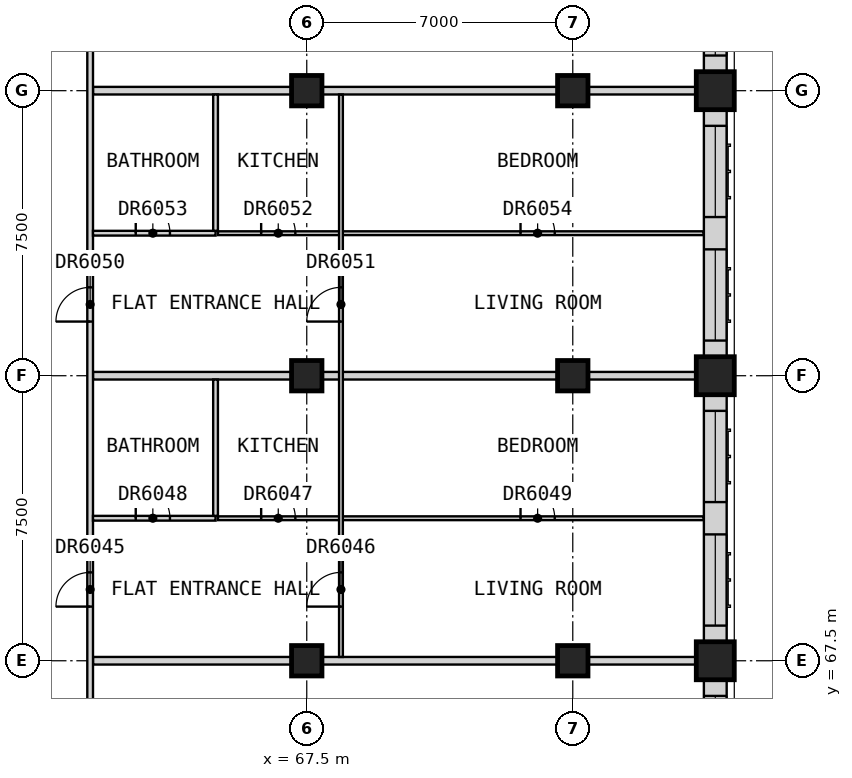
"""IFC4 building model, lengths in metres.
Left out: names, types, materials, properties, quantities, classifications, styles, units other than length and angle.
Written with IfcOpenShell. Run it as: python <this file> out.ifc"""

import sys

from ifc_helpers import new_model, si_unit, direction, frame, frame_2d, origin, origin_2d, place, context, subcontext, project, spatial, rectangle, extrude, element, fill, save


model = new_model("IFC4")
c1 = context("Model", 3, precision=1e-05, world=origin(), true_north=direction((0.0, 1.0)))
c2 = subcontext(c1, "Body", "Model", "MODEL_VIEW")
j1 = project(units=[si_unit("LENGTHUNIT", "METRE"), si_unit("PLANEANGLEUNIT", "RADIAN")], contexts=[c1])
p1 = place(None, origin())
s1 = spatial("IfcSite", under=j1, at=p1, CompositionType="ELEMENT")
p2 = place(p1, origin())
s2 = spatial("IfcBuilding", under=s1, at=p2, CompositionType="ELEMENT")
p3 = place(p2, frame((0.0, 0.0, 254.7)))
s3 = spatial("IfcBuildingStorey", under=s2, at=p3, CompositionType="ELEMENT", Elevation=254.7)
for number, where, z_axis, x_axis in (
    (1, (78.25, 67.5, 0.0), (0.0, 0.0, 1.0), (1.0, 0.0, 0.0)),
    (2, (78.25, 75.0, 0.0), (0.0, 0.0, 1.0), (1.0, 0.0, 0.0)),
    (3, (78.25, 82.5, 0.0), (0.0, 0.0, 1.0), (1.0, 0.0, 0.0)),
):
    element("IfcColumn", number, at=place(p3, frame(where, z_axis=z_axis, x_axis=x_axis)), inside=s3, PredefinedType="COLUMN", context=c2, shape_type="SweptSolid", body=[
        extrude(rectangle(XDim=1.0, YDim=1.0, at=origin_2d()), origin(), (0.0, 0.0, 1.0), 3.5),
    ])
for number, where, z_axis, x_axis in (
    (4, (67.5, 67.5, 0.0), (0.0, 0.0, 1.0), (1.0, 0.0, 0.0)),
    (5, (67.5, 75.0, 0.0), (0.0, 0.0, 1.0), (1.0, 0.0, 0.0)),
    (6, (67.5, 82.5, 0.0), (0.0, 0.0, 1.0), (1.0, 0.0, 0.0)),
    (7, (74.5, 67.5, 0.0), (0.0, 0.0, 1.0), (1.0, 0.0, 0.0)),
    (8, (74.5, 75.0, 0.0), (0.0, 0.0, 1.0), (1.0, 0.0, 0.0)),
    (9, (74.5, 82.5, 0.0), (0.0, 0.0, 1.0), (1.0, 0.0, 0.0)),
):
    element("IfcColumn", number, at=place(p3, frame(where, z_axis=z_axis, x_axis=x_axis)), inside=s3, PredefinedType="COLUMN", context=c2, shape_type="SweptSolid", body=[
        extrude(rectangle(XDim=0.8, YDim=0.8, at=origin_2d()), origin(), (0.0, 0.0, 1.0), 3.5),
    ])
p4 = place(p3, frame((78.25, 60.5, 0.0), z_axis=(0.0, 0.0, 1.0), x_axis=(0.0, 1.0, 0.0)))
e10 = element("IfcWall", 10, at=p4, inside=s3, PredefinedType="SOLIDWALL", context=c2, shape_type="SweptSolid", body=[
    extrude(rectangle(XDim=6.5, YDim=0.6, at=frame_2d((3.25, 0.0))), origin(), (0.0, 0.0, 1.0), 2.75),
])
p5 = place(p4, frame((0.425, 0.0, 0.8)))
e11 = element("IfcOpeningElement", 11, at=p5, cuts=e10, PredefinedType="OPENING", context=c2, shape_type="SweptSolid", body=[
    extrude(rectangle(XDim=2.4, YDim=1.8, at=frame_2d((1.2, 0.9))), frame((0.0, 0.31, 0.0), z_axis=(0.0, -1.0, 0.0), x_axis=(1.0, 0.0, 0.0)), (0.0, 0.0, 1.0), 0.62),
])
p6 = place(p4, frame((3.675, 0.0, 0.8)))
e12 = element("IfcOpeningElement", 12, at=p6, cuts=e10, PredefinedType="OPENING", context=c2, shape_type="SweptSolid", body=[
    extrude(rectangle(XDim=2.4, YDim=1.8, at=frame_2d((1.2, 0.9))), frame((0.0, 0.31, 0.0), z_axis=(0.0, -1.0, 0.0), x_axis=(1.0, 0.0, 0.0)), (0.0, 0.0, 1.0), 0.62),
])
p7 = place(p3, frame((78.25, 68.0, 0.0), z_axis=(0.0, 0.0, 1.0), x_axis=(0.0, 1.0, 0.0)))
e13 = element("IfcWall", 13, at=p7, inside=s3, PredefinedType="SOLIDWALL", context=c2, shape_type="SweptSolid", body=[
    extrude(rectangle(XDim=6.5, YDim=0.6, at=frame_2d((3.25, 0.0))), origin(), (0.0, 0.0, 1.0), 2.75),
])
p8 = place(p7, frame((0.425, 0.0, 0.8)))
e14 = element("IfcOpeningElement", 14, at=p8, cuts=e13, PredefinedType="OPENING", context=c2, shape_type="SweptSolid", body=[
    extrude(rectangle(XDim=2.4, YDim=1.8, at=frame_2d((1.2, 0.9))), frame((0.0, 0.31, 0.0), z_axis=(0.0, -1.0, 0.0), x_axis=(1.0, 0.0, 0.0)), (0.0, 0.0, 1.0), 0.62),
])
p9 = place(p7, frame((3.675, 0.0, 0.8)))
e15 = element("IfcOpeningElement", 15, at=p9, cuts=e13, PredefinedType="OPENING", context=c2, shape_type="SweptSolid", body=[
    extrude(rectangle(XDim=2.4, YDim=1.8, at=frame_2d((1.2, 0.9))), frame((0.0, 0.31, 0.0), z_axis=(0.0, -1.0, 0.0), x_axis=(1.0, 0.0, 0.0)), (0.0, 0.0, 1.0), 0.62),
])
p10 = place(p3, frame((78.25, 75.5, 0.0), z_axis=(0.0, 0.0, 1.0), x_axis=(0.0, 1.0, 0.0)))
e16 = element("IfcWall", 16, at=p10, inside=s3, PredefinedType="SOLIDWALL", context=c2, shape_type="SweptSolid", body=[
    extrude(rectangle(XDim=6.5, YDim=0.6, at=frame_2d((3.25, 0.0))), origin(), (0.0, 0.0, 1.0), 2.75),
])
p11 = place(p10, frame((0.425, 0.0, 0.8)))
e17 = element("IfcOpeningElement", 17, at=p11, cuts=e16, PredefinedType="OPENING", context=c2, shape_type="SweptSolid", body=[
    extrude(rectangle(XDim=2.4, YDim=1.8, at=frame_2d((1.2, 0.9))), frame((0.0, 0.31, 0.0), z_axis=(0.0, -1.0, 0.0), x_axis=(1.0, 0.0, 0.0)), (0.0, 0.0, 1.0), 0.62),
])
p12 = place(p10, frame((3.675, 0.0, 0.8)))
e18 = element("IfcOpeningElement", 18, at=p12, cuts=e16, PredefinedType="OPENING", context=c2, shape_type="SweptSolid", body=[
    extrude(rectangle(XDim=2.4, YDim=1.8, at=frame_2d((1.2, 0.9))), frame((0.0, 0.31, 0.0), z_axis=(0.0, -1.0, 0.0), x_axis=(1.0, 0.0, 0.0)), (0.0, 0.0, 1.0), 0.62),
])
p13 = place(p3, frame((78.25, 83.0, 0.0), z_axis=(0.0, 0.0, 1.0), x_axis=(0.0, 1.0, 0.0)))
e19 = element("IfcWall", 19, at=p13, inside=s3, PredefinedType="SOLIDWALL", context=c2, shape_type="SweptSolid", body=[
    extrude(rectangle(XDim=6.5, YDim=0.6, at=frame_2d((3.25, 0.0))), origin(), (0.0, 0.0, 1.0), 2.75),
])
p14 = place(p13, frame((0.425, 0.0, 0.8)))
e20 = element("IfcOpeningElement", 20, at=p14, cuts=e19, PredefinedType="OPENING", context=c2, shape_type="SweptSolid", body=[
    extrude(rectangle(XDim=2.4, YDim=1.8, at=frame_2d((1.2, 0.9))), frame((0.0, 0.31, 0.0), z_axis=(0.0, -1.0, 0.0), x_axis=(1.0, 0.0, 0.0)), (0.0, 0.0, 1.0), 0.62),
])
p15 = place(p13, frame((3.675, 0.0, 0.8)))
e21 = element("IfcOpeningElement", 21, at=p15, cuts=e19, PredefinedType="OPENING", context=c2, shape_type="SweptSolid", body=[
    extrude(rectangle(XDim=2.4, YDim=1.8, at=frame_2d((1.2, 0.9))), frame((0.0, 0.31, 0.0), z_axis=(0.0, -1.0, 0.0), x_axis=(1.0, 0.0, 0.0)), (0.0, 0.0, 1.0), 0.62),
])
for number, where, z_axis, x_axis in (
    (22, (61.875, 67.5, 0.0), (0.0, 0.0, 1.0), (1.0, 0.0, 0.0)),
    (23, (61.875, 75.0, 0.0), (0.0, 0.0, 1.0), (1.0, 0.0, 0.0)),
    (24, (61.875, 82.5, 0.0), (0.0, 0.0, 1.0), (1.0, 0.0, 0.0)),
):
    element("IfcWall", number, at=place(p3, frame(where, z_axis=z_axis, x_axis=x_axis)), inside=s3, PredefinedType="PARTITIONING", context=c2, shape_type="SweptSolid", body=[
        extrude(rectangle(XDim=16.875, YDim=0.2, at=frame_2d((8.438, 0.0))), origin(), (0.0, 0.0, 1.0), 3.1),
    ])
p16 = place(p3, frame((61.8, 58.275, 0.0), z_axis=(0.0, 0.0, 1.0), x_axis=(0.0, 1.0, 0.0)))
e25 = element("IfcWall", 25, at=p16, inside=s3, PredefinedType="PARTITIONING", context=c2, shape_type="SweptSolid", body=[
    extrude(rectangle(XDim=25.95, YDim=0.15, at=frame_2d((12.975, 0.0))), origin(), (0.0, 0.0, 1.0), 3.1),
])
p17 = place(p16, frame((4.575, 0.0, 0.0)))
e26 = element("IfcOpeningElement", 26, at=p17, cuts=e25, PredefinedType="OPENING", context=c2, shape_type="SweptSolid", body=[
    extrude(rectangle(XDim=1.8, YDim=2.1, at=frame_2d((0.9, 1.05))), frame((0.0, 0.085, 0.0), z_axis=(0.0, -1.0, 0.0), x_axis=(1.0, 0.0, 0.0)), (0.0, 0.0, 1.0), 0.17),
])
p18 = place(p16, frame((10.65, 0.0, 0.0)))
e27 = element("IfcOpeningElement", 27, at=p18, cuts=e25, PredefinedType="OPENING", context=c2, shape_type="SweptSolid", body=[
    extrude(rectangle(XDim=0.9, YDim=2.1, at=frame_2d((0.45, 1.05))), frame((0.0, 0.085, 0.0), z_axis=(0.0, -1.0, 0.0), x_axis=(1.0, 0.0, 0.0)), (0.0, 0.0, 1.0), 0.17),
])
p19 = place(p16, frame((18.15, 0.0, 0.0)))
e28 = element("IfcOpeningElement", 28, at=p19, cuts=e25, PredefinedType="OPENING", context=c2, shape_type="SweptSolid", body=[
    extrude(rectangle(XDim=0.9, YDim=2.1, at=frame_2d((0.45, 1.05))), frame((0.0, 0.085, 0.0), z_axis=(0.0, -1.0, 0.0), x_axis=(1.0, 0.0, 0.0)), (0.0, 0.0, 1.0), 0.17),
])
p20 = place(p3, frame((65.163, 71.25, 0.0), z_axis=(0.0, 0.0, 1.0), x_axis=(1.0, 0.0, 0.0)))
e29 = element("IfcWall", 29, at=p20, inside=s3, PredefinedType="PARTITIONING", context=c2, shape_type="SweptSolid", body=[
    extrude(rectangle(XDim=12.777, YDim=0.1, at=frame_2d((6.389, 0.0))), origin(), (0.0, 0.0, 1.0), 3.1),
])
p21 = place(p20, frame((1.137, 0.0, 0.0)))
e30 = element("IfcOpeningElement", 30, at=p21, cuts=e29, PredefinedType="OPENING", context=c2, shape_type="SweptSolid", body=[
    extrude(rectangle(XDim=0.9, YDim=2.1, at=frame_2d((0.45, 1.05))), frame((0.0, 0.06, 0.0), z_axis=(0.0, -1.0, 0.0), x_axis=(1.0, 0.0, 0.0)), (0.0, 0.0, 1.0), 0.12),
])
p22 = place(p20, frame((7.962, 0.0, 0.0)))
e31 = element("IfcOpeningElement", 31, at=p22, cuts=e29, PredefinedType="OPENING", context=c2, shape_type="SweptSolid", body=[
    extrude(rectangle(XDim=0.9, YDim=2.1, at=frame_2d((0.45, 1.05))), frame((0.0, 0.06, 0.0), z_axis=(0.0, -1.0, 0.0), x_axis=(1.0, 0.0, 0.0)), (0.0, 0.0, 1.0), 0.12),
])
p23 = place(p3, frame((65.163, 78.75, 0.0), z_axis=(0.0, 0.0, 1.0), x_axis=(1.0, 0.0, 0.0)))
e32 = element("IfcWall", 32, at=p23, inside=s3, PredefinedType="PARTITIONING", context=c2, shape_type="SweptSolid", body=[
    extrude(rectangle(XDim=12.777, YDim=0.1, at=frame_2d((6.389, 0.0))), origin(), (0.0, 0.0, 1.0), 3.1),
])
p24 = place(p23, frame((1.137, 0.0, 0.0)))
e33 = element("IfcOpeningElement", 33, at=p24, cuts=e32, PredefinedType="OPENING", context=c2, shape_type="SweptSolid", body=[
    extrude(rectangle(XDim=0.9, YDim=2.1, at=frame_2d((0.45, 1.05))), frame((0.0, 0.06, 0.0), z_axis=(0.0, -1.0, 0.0), x_axis=(1.0, 0.0, 0.0)), (0.0, 0.0, 1.0), 0.12),
])
p25 = place(p23, frame((7.962, 0.0, 0.0)))
e34 = element("IfcOpeningElement", 34, at=p25, cuts=e32, PredefinedType="OPENING", context=c2, shape_type="SweptSolid", body=[
    extrude(rectangle(XDim=0.9, YDim=2.1, at=frame_2d((0.45, 1.05))), frame((0.0, 0.06, 0.0), z_axis=(0.0, -1.0, 0.0), x_axis=(1.0, 0.0, 0.0)), (0.0, 0.0, 1.0), 0.12),
])
p26 = place(p3, frame((68.4, 67.6, 0.0), z_axis=(0.0, 0.0, 1.0), x_axis=(0.0, 1.0, 0.0)))
e35 = element("IfcWall", 35, at=p26, inside=s3, PredefinedType="PARTITIONING", context=c2, shape_type="SweptSolid", body=[
    extrude(rectangle(XDim=14.8, YDim=0.1, at=frame_2d((7.4, 0.0))), origin(), (0.0, 0.0, 1.0), 3.1),
])
p27 = place(p26, frame((1.325, 0.0, 0.0)))
e36 = element("IfcOpeningElement", 36, at=p27, cuts=e35, PredefinedType="OPENING", context=c2, shape_type="SweptSolid", body=[
    extrude(rectangle(XDim=0.9, YDim=2.1, at=frame_2d((0.45, 1.05))), frame((0.0, 0.06, 0.0), z_axis=(0.0, -1.0, 0.0), x_axis=(1.0, 0.0, 0.0)), (0.0, 0.0, 1.0), 0.12),
])
p28 = place(p26, frame((8.825, 0.0, 0.0)))
e37 = element("IfcOpeningElement", 37, at=p28, cuts=e35, PredefinedType="OPENING", context=c2, shape_type="SweptSolid", body=[
    extrude(rectangle(XDim=0.9, YDim=2.1, at=frame_2d((0.45, 1.05))), frame((0.0, 0.06, 0.0), z_axis=(0.0, -1.0, 0.0), x_axis=(1.0, 0.0, 0.0)), (0.0, 0.0, 1.0), 0.12),
])
p29 = place(p3, frame((61.875, 71.25, 0.0), z_axis=(0.0, 0.0, 1.0), x_axis=(1.0, 0.0, 0.0)))
e38 = element("IfcWall", 38, at=p29, inside=s3, PredefinedType="PARTITIONING", context=c2, shape_type="SweptSolid", body=[
    extrude(rectangle(XDim=3.225, YDim=0.125, at=frame_2d((1.613, 0.0))), origin(), (0.0, 0.0, 1.0), 3.1),
])
p30 = place(p29, frame((1.125, 0.0, 0.0)))
e39 = element("IfcOpeningElement", 39, at=p30, cuts=e38, PredefinedType="OPENING", context=c2, shape_type="SweptSolid", body=[
    extrude(rectangle(XDim=0.9, YDim=2.1, at=frame_2d((0.45, 1.05))), frame((0.0, 0.073, 0.0), z_axis=(0.0, -1.0, 0.0), x_axis=(1.0, 0.0, 0.0)), (0.0, 0.0, 1.0), 0.145),
])
p31 = place(p3, frame((61.875, 78.75, 0.0), z_axis=(0.0, 0.0, 1.0), x_axis=(1.0, 0.0, 0.0)))
e40 = element("IfcWall", 40, at=p31, inside=s3, PredefinedType="PARTITIONING", context=c2, shape_type="SweptSolid", body=[
    extrude(rectangle(XDim=3.225, YDim=0.125, at=frame_2d((1.613, 0.0))), origin(), (0.0, 0.0, 1.0), 3.1),
])
p32 = place(p31, frame((1.125, 0.0, 0.0)))
e41 = element("IfcOpeningElement", 41, at=p32, cuts=e40, PredefinedType="OPENING", context=c2, shape_type="SweptSolid", body=[
    extrude(rectangle(XDim=0.9, YDim=2.1, at=frame_2d((0.45, 1.05))), frame((0.0, 0.073, 0.0), z_axis=(0.0, -1.0, 0.0), x_axis=(1.0, 0.0, 0.0)), (0.0, 0.0, 1.0), 0.145),
])
for number, where, z_axis, x_axis in (
    (42, (65.1, 71.312, 0.0), (0.0, 0.0, 1.0), (0.0, 1.0, 0.0)),
    (43, (65.1, 78.812, 0.0), (0.0, 0.0, 1.0), (0.0, 1.0, 0.0)),
):
    element("IfcWall", number, at=place(p3, frame(where, z_axis=z_axis, x_axis=x_axis)), inside=s3, PredefinedType="PARTITIONING", context=c2, shape_type="SweptSolid", body=[
        extrude(rectangle(XDim=3.587, YDim=0.125, at=frame_2d((1.794, 0.0))), origin(), (0.0, 0.0, 1.0), 3.1),
    ])
p33 = place(p6, origin())
e44 = element("IfcWindow", 44, at=p33, inside=s3, PartitioningType="SINGLE_PANEL", PredefinedType="WINDOW", context=c2, shape_type="SweptSolid", body=[
    extrude(rectangle(XDim=2.4, YDim=1.8, at=frame_2d((1.2, 0.9))), frame((0.0, -0.07, 0.0), z_axis=(0.0, -1.0, 0.0), x_axis=(1.0, 0.0, 0.0)), (0.0, 0.0, 1.0), 0.06),
])
fill(e12, e44)
p34 = place(p8, origin())
e45 = element("IfcWindow", 45, at=p34, inside=s3, PartitioningType="SINGLE_PANEL", PredefinedType="WINDOW", context=c2, shape_type="SweptSolid", body=[
    extrude(rectangle(XDim=2.4, YDim=1.8, at=frame_2d((1.2, 0.9))), frame((0.0, -0.07, 0.0), z_axis=(0.0, -1.0, 0.0), x_axis=(1.0, 0.0, 0.0)), (0.0, 0.0, 1.0), 0.06),
])
fill(e14, e45)
p35 = place(p9, origin())
e46 = element("IfcWindow", 46, at=p35, inside=s3, PartitioningType="SINGLE_PANEL", PredefinedType="WINDOW", context=c2, shape_type="SweptSolid", body=[
    extrude(rectangle(XDim=2.4, YDim=1.8, at=frame_2d((1.2, 0.9))), frame((0.0, -0.07, 0.0), z_axis=(0.0, -1.0, 0.0), x_axis=(1.0, 0.0, 0.0)), (0.0, 0.0, 1.0), 0.06),
])
fill(e15, e46)
p36 = place(p11, origin())
e47 = element("IfcWindow", 47, at=p36, inside=s3, PartitioningType="SINGLE_PANEL", PredefinedType="WINDOW", context=c2, shape_type="SweptSolid", body=[
    extrude(rectangle(XDim=2.4, YDim=1.8, at=frame_2d((1.2, 0.9))), frame((0.0, -0.07, 0.0), z_axis=(0.0, -1.0, 0.0), x_axis=(1.0, 0.0, 0.0)), (0.0, 0.0, 1.0), 0.06),
])
fill(e17, e47)
p37 = place(p12, origin())
e48 = element("IfcWindow", 48, at=p37, inside=s3, PartitioningType="SINGLE_PANEL", PredefinedType="WINDOW", context=c2, shape_type="SweptSolid", body=[
    extrude(rectangle(XDim=2.4, YDim=1.8, at=frame_2d((1.2, 0.9))), frame((0.0, -0.07, 0.0), z_axis=(0.0, -1.0, 0.0), x_axis=(1.0, 0.0, 0.0)), (0.0, 0.0, 1.0), 0.06),
])
fill(e18, e48)
p38 = place(p14, origin())
e49 = element("IfcWindow", 49, at=p38, inside=s3, PartitioningType="SINGLE_PANEL", PredefinedType="WINDOW", context=c2, shape_type="SweptSolid", body=[
    extrude(rectangle(XDim=2.4, YDim=1.8, at=frame_2d((1.2, 0.9))), frame((0.0, -0.07, 0.0), z_axis=(0.0, -1.0, 0.0), x_axis=(1.0, 0.0, 0.0)), (0.0, 0.0, 1.0), 0.06),
])
fill(e20, e49)
p39 = place(p18, origin())
e50 = element("IfcDoor", 50, at=p39, inside=s3, OperationType="SINGLE_SWING_RIGHT", PredefinedType="DOOR", context=c2, shape_type="SweptSolid", body=[
    extrude(rectangle(XDim=0.9, YDim=2.1, at=frame_2d((0.45, 1.05))), frame((0.0, 0.025, 0.0), z_axis=(0.0, -1.0, 0.0), x_axis=(1.0, 0.0, 0.0)), (0.0, 0.0, 1.0), 0.05),
])
fill(e27, e50)
p40 = place(p27, origin())
e51 = element("IfcDoor", 51, at=p40, inside=s3, OperationType="SINGLE_SWING_LEFT", PredefinedType="DOOR", context=c2, shape_type="SweptSolid", body=[
    extrude(rectangle(XDim=0.9, YDim=2.1, at=frame_2d((0.45, 1.05))), frame((0.0, 0.025, 0.0), z_axis=(0.0, -1.0, 0.0), x_axis=(1.0, 0.0, 0.0)), (0.0, 0.0, 1.0), 0.05),
])
fill(e36, e51)
p41 = place(p21, origin())
e52 = element("IfcDoor", 52, at=p41, inside=s3, OperationType="SINGLE_SWING_LEFT", PredefinedType="DOOR", context=c2, shape_type="SweptSolid", body=[
    extrude(rectangle(XDim=0.9, YDim=2.1, at=frame_2d((0.45, 1.05))), frame((0.0, 0.025, 0.0), z_axis=(0.0, -1.0, 0.0), x_axis=(1.0, 0.0, 0.0)), (0.0, 0.0, 1.0), 0.05),
])
fill(e30, e52)
p42 = place(p30, origin())
e53 = element("IfcDoor", 53, at=p42, inside=s3, OperationType="SINGLE_SWING_RIGHT", PredefinedType="DOOR", context=c2, shape_type="SweptSolid", body=[
    extrude(rectangle(XDim=0.9, YDim=2.1, at=frame_2d((0.45, 1.05))), frame((0.0, 0.025, 0.0), z_axis=(0.0, -1.0, 0.0), x_axis=(1.0, 0.0, 0.0)), (0.0, 0.0, 1.0), 0.05),
])
fill(e39, e53)
p43 = place(p22, origin())
e54 = element("IfcDoor", 54, at=p43, inside=s3, OperationType="SINGLE_SWING_LEFT", PredefinedType="DOOR", context=c2, shape_type="SweptSolid", body=[
    extrude(rectangle(XDim=0.9, YDim=2.1, at=frame_2d((0.45, 1.05))), frame((0.0, 0.025, 0.0), z_axis=(0.0, -1.0, 0.0), x_axis=(1.0, 0.0, 0.0)), (0.0, 0.0, 1.0), 0.05),
])
fill(e31, e54)
p44 = place(p19, origin())
e55 = element("IfcDoor", 55, at=p44, inside=s3, OperationType="SINGLE_SWING_RIGHT", PredefinedType="DOOR", context=c2, shape_type="SweptSolid", body=[
    extrude(rectangle(XDim=0.9, YDim=2.1, at=frame_2d((0.45, 1.05))), frame((0.0, 0.025, 0.0), z_axis=(0.0, -1.0, 0.0), x_axis=(1.0, 0.0, 0.0)), (0.0, 0.0, 1.0), 0.05),
])
fill(e28, e55)
p45 = place(p28, origin())
e56 = element("IfcDoor", 56, at=p45, inside=s3, OperationType="SINGLE_SWING_LEFT", PredefinedType="DOOR", context=c2, shape_type="SweptSolid", body=[
    extrude(rectangle(XDim=0.9, YDim=2.1, at=frame_2d((0.45, 1.05))), frame((0.0, 0.025, 0.0), z_axis=(0.0, -1.0, 0.0), x_axis=(1.0, 0.0, 0.0)), (0.0, 0.0, 1.0), 0.05),
])
fill(e37, e56)
p46 = place(p24, origin())
e57 = element("IfcDoor", 57, at=p46, inside=s3, OperationType="SINGLE_SWING_LEFT", PredefinedType="DOOR", context=c2, shape_type="SweptSolid", body=[
    extrude(rectangle(XDim=0.9, YDim=2.1, at=frame_2d((0.45, 1.05))), frame((0.0, 0.025, 0.0), z_axis=(0.0, -1.0, 0.0), x_axis=(1.0, 0.0, 0.0)), (0.0, 0.0, 1.0), 0.05),
])
fill(e33, e57)
p47 = place(p32, origin())
e58 = element("IfcDoor", 58, at=p47, inside=s3, OperationType="SINGLE_SWING_RIGHT", PredefinedType="DOOR", context=c2, shape_type="SweptSolid", body=[
    extrude(rectangle(XDim=0.9, YDim=2.1, at=frame_2d((0.45, 1.05))), frame((0.0, 0.025, 0.0), z_axis=(0.0, -1.0, 0.0), x_axis=(1.0, 0.0, 0.0)), (0.0, 0.0, 1.0), 0.05),
])
fill(e41, e58)
p48 = place(p25, origin())
e59 = element("IfcDoor", 59, at=p48, inside=s3, OperationType="SINGLE_SWING_LEFT", PredefinedType="DOOR", context=c2, shape_type="SweptSolid", body=[
    extrude(rectangle(XDim=0.9, YDim=2.1, at=frame_2d((0.45, 1.05))), frame((0.0, 0.025, 0.0), z_axis=(0.0, -1.0, 0.0), x_axis=(1.0, 0.0, 0.0)), (0.0, 0.0, 1.0), 0.05),
])
fill(e34, e59)
save(model, sys.argv[1])
